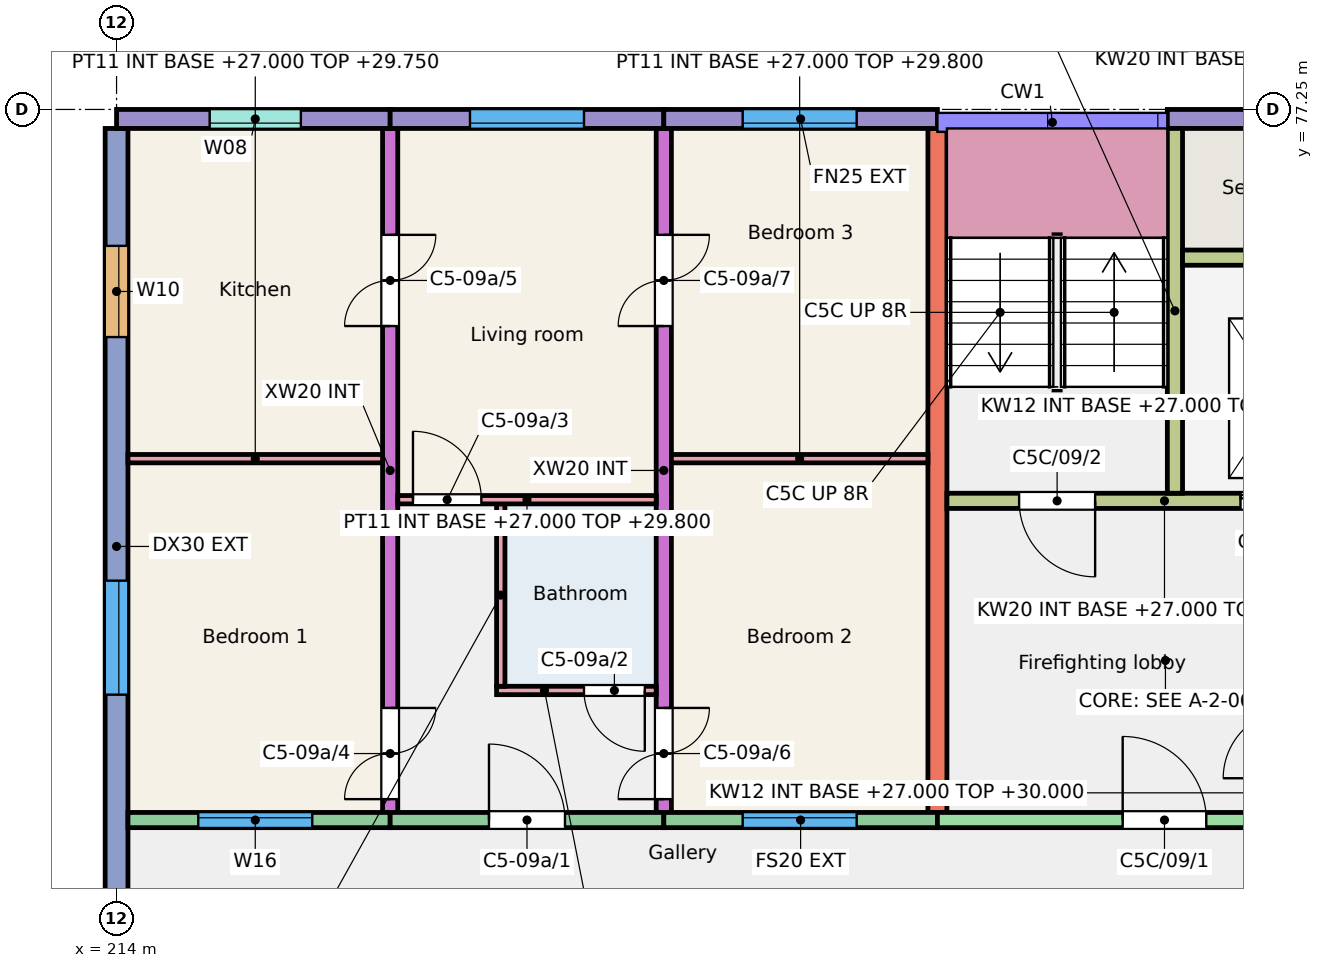
"""IFC4 building model, lengths in metres.
Left out: names, types, materials, properties, quantities, classifications, styles, units other than length and angle.
Written with IfcOpenShell. Run it as: python <this file> out.ifc"""

import sys

from ifc_helpers import new_model, si_unit, direction, frame, frame_2d, origin, place, context, subcontext, project, spatial, rectangle, extrude, element, fill, save


model = new_model("IFC4")
c1 = context("Model", 3, precision=1e-05, world=origin(), true_north=direction((0.0, 1.0)))
c2 = subcontext(c1, "Body", "Model", "MODEL_VIEW")
j1 = project(units=[si_unit("LENGTHUNIT", "METRE"), si_unit("PLANEANGLEUNIT", "RADIAN")], contexts=[c1])
p1 = place(None, origin())
s1 = spatial("IfcSite", under=j1, at=p1, CompositionType="ELEMENT")
p2 = place(p1, origin())
s2 = spatial("IfcBuilding", under=s1, at=p2, CompositionType="ELEMENT")
p3 = place(p2, frame((0.0, 0.0, 27.0)))
s3 = spatial("IfcBuildingStorey", under=s2, at=p3, CompositionType="ELEMENT", Elevation=27.0)
p4 = place(p3, frame((214.0, 66.0, 0.0), z_axis=(0.0, 0.0, 1.0), x_axis=(0.0, 1.0, 0.0)))
e1 = element("IfcWall", 1, at=p4, inside=s3, PredefinedType="SHEAR", context=c2, shape_type="SweptSolid", body=[
    extrude(rectangle(XDim=11.0, YDim=0.3, at=frame_2d((5.5, 0.0))), origin(), (0.0, 0.0, 1.0), 3.0),
])
p5 = place(p4, frame((3.55, 0.0, 0.9)))
e2 = element("IfcOpeningElement", 2, at=p5, cuts=e1, PredefinedType="OPENING", context=c2, shape_type="SweptSolid", body=[
    extrude(rectangle(XDim=1.5, YDim=1.5, at=frame_2d((0.75, 0.75))), frame((0.0, 0.16, 0.0), z_axis=(0.0, -1.0, 0.0), x_axis=(1.0, 0.0, 0.0)), (0.0, 0.0, 1.0), 0.32),
])
p6 = place(p4, frame((8.255, 0.0, 0.9)))
e3 = element("IfcOpeningElement", 3, at=p6, cuts=e1, PredefinedType="OPENING", context=c2, shape_type="SweptSolid", body=[
    extrude(rectangle(XDim=1.2, YDim=1.5, at=frame_2d((0.6, 0.75))), frame((0.0, 0.16, 0.0), z_axis=(0.0, -1.0, 0.0), x_axis=(1.0, 0.0, 0.0)), (0.0, 0.0, 1.0), 0.32),
])
p7 = place(p3, frame((217.6, 68.0, 0.0), z_axis=(0.0, 0.0, 1.0), x_axis=(0.0, 1.0, 0.0)))
e4 = element("IfcWall", 4, at=p7, inside=s3, PredefinedType="SHEAR", context=c2, shape_type="SweptSolid", body=[
    extrude(rectangle(XDim=9.0, YDim=0.2, at=frame_2d((4.5, 0.0))), origin(), (0.0, 0.0, 1.0), 3.0),
])
p8 = place(p7, frame((0.175, 0.0, 0.0)))
e5 = element("IfcOpeningElement", 5, at=p8, cuts=e4, PredefinedType="OPENING", context=c2, shape_type="SweptSolid", body=[
    extrude(rectangle(XDim=1.2, YDim=2.1, at=frame_2d((0.6, 1.05))), frame((0.0, 0.11, 0.0), z_axis=(0.0, -1.0, 0.0), x_axis=(1.0, 0.0, 0.0)), (0.0, 0.0, 1.0), 0.22),
])
p9 = place(p7, frame((6.4, 0.0, 0.0)))
e6 = element("IfcOpeningElement", 6, at=p9, cuts=e4, PredefinedType="OPENING", context=c2, shape_type="SweptSolid", body=[
    extrude(rectangle(XDim=1.2, YDim=2.1, at=frame_2d((0.6, 1.05))), frame((0.0, 0.11, 0.0), z_axis=(0.0, -1.0, 0.0), x_axis=(1.0, 0.0, 0.0)), (0.0, 0.0, 1.0), 0.22),
])
p10 = place(p3, frame((221.2, 68.0, 0.0), z_axis=(0.0, 0.0, 1.0), x_axis=(0.0, 1.0, 0.0)))
e7 = element("IfcWall", 7, at=p10, inside=s3, PredefinedType="SHEAR", context=c2, shape_type="SweptSolid", body=[
    extrude(rectangle(XDim=9.0, YDim=0.2, at=frame_2d((4.5, 0.0))), origin(), (0.0, 0.0, 1.0), 3.0),
])
p11 = place(p10, frame((0.175, 0.0, 0.0)))
e8 = element("IfcOpeningElement", 8, at=p11, cuts=e7, PredefinedType="OPENING", context=c2, shape_type="SweptSolid", body=[
    extrude(rectangle(XDim=1.2, YDim=2.1, at=frame_2d((0.6, 1.05))), frame((0.0, 0.11, 0.0), z_axis=(0.0, -1.0, 0.0), x_axis=(1.0, 0.0, 0.0)), (0.0, 0.0, 1.0), 0.22),
])
p12 = place(p10, frame((6.4, 0.0, 0.0)))
e9 = element("IfcOpeningElement", 9, at=p12, cuts=e7, PredefinedType="OPENING", context=c2, shape_type="SweptSolid", body=[
    extrude(rectangle(XDim=1.2, YDim=2.1, at=frame_2d((0.6, 1.05))), frame((0.0, 0.11, 0.0), z_axis=(0.0, -1.0, 0.0), x_axis=(1.0, 0.0, 0.0)), (0.0, 0.0, 1.0), 0.22),
])
p13 = place(p3, frame((224.8, 68.0, 0.0), z_axis=(0.0, 0.0, 1.0), x_axis=(0.0, 1.0, 0.0)))
e10 = element("IfcWall", 10, at=p13, inside=s3, PredefinedType="SHEAR", context=c2, shape_type="SweptSolid", body=[
    extrude(rectangle(XDim=9.0, YDim=0.25, at=frame_2d((4.5, 0.0))), origin(), (0.0, 0.0, 1.0), 3.0),
])
p14 = place(p3, frame((214.0, 77.125, 0.0), z_axis=(0.0, 0.0, 1.0), x_axis=(1.0, 0.0, 0.0)))
e11 = element("IfcWall", 11, at=p14, inside=s3, PredefinedType="SOLIDWALL", context=c2, shape_type="SweptSolid", body=[
    extrude(rectangle(XDim=3.6, YDim=0.25, at=frame_2d((1.8, 0.0))), origin(), (0.0, 0.0, 1.0), 3.0),
])
p15 = place(p14, frame((1.225, 0.0, 1.1)))
e12 = element("IfcOpeningElement", 12, at=p15, cuts=e11, PredefinedType="OPENING", context=c2, shape_type="SweptSolid", body=[
    extrude(rectangle(XDim=1.2, YDim=1.3, at=frame_2d((0.6, 0.65))), frame((0.0, 0.135, 0.0), z_axis=(0.0, -1.0, 0.0), x_axis=(1.0, 0.0, 0.0)), (0.0, 0.0, 1.0), 0.27),
])
p16 = place(p3, frame((214.15, 67.9, 0.0), z_axis=(0.0, 0.0, 1.0), x_axis=(1.0, 0.0, 0.0)))
e13 = element("IfcWall", 13, at=p16, inside=s3, PredefinedType="SOLIDWALL", context=c2, shape_type="SweptSolid", body=[
    extrude(rectangle(XDim=3.45, YDim=0.2, at=frame_2d((1.725, 0.0))), origin(), (0.0, 0.0, 1.0), 3.0),
])
p17 = place(p16, frame((0.925, 0.0, 0.9)))
e14 = element("IfcOpeningElement", 14, at=p17, cuts=e13, PredefinedType="OPENING", context=c2, shape_type="SweptSolid", body=[
    extrude(rectangle(XDim=1.5, YDim=1.5, at=frame_2d((0.75, 0.75))), frame((0.0, 0.11, 0.0), z_axis=(0.0, -1.0, 0.0), x_axis=(1.0, 0.0, 0.0)), (0.0, 0.0, 1.0), 0.22),
])
p18 = place(p3, frame((217.6, 77.125, 0.0), z_axis=(0.0, 0.0, 1.0), x_axis=(1.0, 0.0, 0.0)))
e15 = element("IfcWall", 15, at=p18, inside=s3, PredefinedType="SOLIDWALL", context=c2, shape_type="SweptSolid", body=[
    extrude(rectangle(XDim=3.6, YDim=0.25, at=frame_2d((1.8, 0.0))), origin(), (0.0, 0.0, 1.0), 3.0),
])
p19 = place(p18, frame((1.05, 0.0, 0.9)))
e16 = element("IfcOpeningElement", 16, at=p19, cuts=e15, PredefinedType="OPENING", context=c2, shape_type="SweptSolid", body=[
    extrude(rectangle(XDim=1.5, YDim=1.5, at=frame_2d((0.75, 0.75))), frame((0.0, 0.135, 0.0), z_axis=(0.0, -1.0, 0.0), x_axis=(1.0, 0.0, 0.0)), (0.0, 0.0, 1.0), 0.27),
])
p20 = place(p3, frame((217.6, 67.9, 0.0), z_axis=(0.0, 0.0, 1.0), x_axis=(1.0, 0.0, 0.0)))
e17 = element("IfcWall", 17, at=p20, inside=s3, PredefinedType="SOLIDWALL", context=c2, shape_type="SweptSolid", body=[
    extrude(rectangle(XDim=3.6, YDim=0.2, at=frame_2d((1.8, 0.0))), origin(), (0.0, 0.0, 1.0), 3.0),
])
p21 = place(p20, frame((1.3, 0.0, 0.0)))
e18 = element("IfcOpeningElement", 18, at=p21, cuts=e17, PredefinedType="OPENING", context=c2, shape_type="SweptSolid", body=[
    extrude(rectangle(XDim=1.0, YDim=2.1, at=frame_2d((0.5, 1.05))), frame((0.0, 0.11, 0.0), z_axis=(0.0, -1.0, 0.0), x_axis=(1.0, 0.0, 0.0)), (0.0, 0.0, 1.0), 0.22),
])
p22 = place(p3, frame((221.2, 77.125, 0.0), z_axis=(0.0, 0.0, 1.0), x_axis=(1.0, 0.0, 0.0)))
e19 = element("IfcWall", 19, at=p22, inside=s3, PredefinedType="SOLIDWALL", context=c2, shape_type="SweptSolid", body=[
    extrude(rectangle(XDim=3.6, YDim=0.25, at=frame_2d((1.8, 0.0))), origin(), (0.0, 0.0, 1.0), 3.0),
])
p23 = place(p22, frame((1.038, 0.0, 0.9)))
e20 = element("IfcOpeningElement", 20, at=p23, cuts=e19, PredefinedType="OPENING", context=c2, shape_type="SweptSolid", body=[
    extrude(rectangle(XDim=1.5, YDim=1.5, at=frame_2d((0.75, 0.75))), frame((0.0, 0.135, 0.0), z_axis=(0.0, -1.0, 0.0), x_axis=(1.0, 0.0, 0.0)), (0.0, 0.0, 1.0), 0.27),
])
p24 = place(p3, frame((221.2, 67.9, 0.0), z_axis=(0.0, 0.0, 1.0), x_axis=(1.0, 0.0, 0.0)))
e21 = element("IfcWall", 21, at=p24, inside=s3, PredefinedType="SOLIDWALL", context=c2, shape_type="SweptSolid", body=[
    extrude(rectangle(XDim=3.6, YDim=0.2, at=frame_2d((1.8, 0.0))), origin(), (0.0, 0.0, 1.0), 3.0),
])
p25 = place(p24, frame((1.038, 0.0, 0.9)))
e22 = element("IfcOpeningElement", 22, at=p25, cuts=e21, PredefinedType="OPENING", context=c2, shape_type="SweptSolid", body=[
    extrude(rectangle(XDim=1.5, YDim=1.5, at=frame_2d((0.75, 0.75))), frame((0.0, 0.11, 0.0), z_axis=(0.0, -1.0, 0.0), x_axis=(1.0, 0.0, 0.0)), (0.0, 0.0, 1.0), 0.22),
])
p26 = place(p3, frame((227.825, 77.125, 0.0), z_axis=(0.0, 0.0, 1.0), x_axis=(1.0, 0.0, 0.0)))
e23 = element("IfcWall", 23, at=p26, inside=s3, PredefinedType="SOLIDWALL", context=c2, shape_type="SweptSolid", body=[
    extrude(rectangle(XDim=2.975, YDim=0.25, at=frame_2d((1.488, 0.0))), origin(), (0.0, 0.0, 1.0), 3.0),
])
p27 = place(p3, frame((224.8, 67.9, 0.0), z_axis=(0.0, 0.0, 1.0), x_axis=(1.0, 0.0, 0.0)))
e24 = element("IfcWall", 24, at=p27, inside=s3, PredefinedType="SHEAR", context=c2, shape_type="SweptSolid", body=[
    extrude(rectangle(XDim=5.85, YDim=0.2, at=frame_2d((2.925, 0.0))), origin(), (0.0, 0.0, 1.0), 3.0),
])
p28 = place(p27, frame((2.438, 0.0, 0.0)))
e25 = element("IfcOpeningElement", 25, at=p28, cuts=e24, PredefinedType="OPENING", context=c2, shape_type="SweptSolid", body=[
    extrude(rectangle(XDim=1.1, YDim=2.1, at=frame_2d((0.55, 1.05))), frame((0.0, 0.11, 0.0), z_axis=(0.0, -1.0, 0.0), x_axis=(1.0, 0.0, 0.0)), (0.0, 0.0, 1.0), 0.22),
])
p29 = place(p3, frame((224.925, 72.1, 0.0), z_axis=(0.0, 0.0, 1.0), x_axis=(1.0, 0.0, 0.0)))
e26 = element("IfcWall", 26, at=p29, inside=s3, PredefinedType="SHEAR", context=c2, shape_type="SweptSolid", body=[
    extrude(rectangle(XDim=5.725, YDim=0.2, at=frame_2d((2.862, 0.0))), origin(), (0.0, 0.0, 1.0), 3.0),
])
p30 = place(p29, frame((0.95, 0.0, 0.0)))
e27 = element("IfcOpeningElement", 27, at=p30, cuts=e26, PredefinedType="OPENING", context=c2, shape_type="SweptSolid", body=[
    extrude(rectangle(XDim=1.0, YDim=2.1, at=frame_2d((0.5, 1.05))), frame((0.0, 0.11, 0.0), z_axis=(0.0, -1.0, 0.0), x_axis=(1.0, 0.0, 0.0)), (0.0, 0.0, 1.0), 0.22),
])
p31 = place(p29, frame((3.863, 0.0, 0.0)))
e28 = element("IfcOpeningElement", 28, at=p31, cuts=e26, PredefinedType="OPENING", context=c2, shape_type="SweptSolid", body=[
    extrude(rectangle(XDim=1.1, YDim=2.1, at=frame_2d((0.55, 1.05))), frame((0.0, 0.11, 0.0), z_axis=(0.0, -1.0, 0.0), x_axis=(1.0, 0.0, 0.0)), (0.0, 0.0, 1.0), 0.22),
])
p32 = place(p3, frame((227.925, 72.2, 0.0), z_axis=(0.0, 0.0, 1.0), x_axis=(0.0, 1.0, 0.0)))
e29 = element("IfcWall", 29, at=p32, inside=s3, PredefinedType="SHEAR", context=c2, shape_type="SweptSolid", body=[
    extrude(rectangle(XDim=4.8, YDim=0.2, at=frame_2d((2.4, 0.0))), origin(), (0.0, 0.0, 1.0), 3.0),
])
p33 = place(p3, frame((228.025, 75.3, 0.0), z_axis=(0.0, 0.0, 1.0), x_axis=(1.0, 0.0, 0.0)))
e30 = element("IfcWall", 30, at=p33, inside=s3, PredefinedType="SHEAR", context=c2, shape_type="SweptSolid", body=[
    extrude(rectangle(XDim=2.625, YDim=0.2, at=frame_2d((1.312, 0.0))), origin(), (0.0, 0.0, 1.0), 3.0),
])
p34 = place(p3, frame((219.0, 69.605, 0.0), z_axis=(0.0, 0.0, 1.0), x_axis=(1.0, 0.0, 0.0)))
e31 = element("IfcWall", 31, at=p34, inside=s3, PredefinedType="PARTITIONING", context=c2, shape_type="SweptSolid", body=[
    extrude(rectangle(XDim=2.1, YDim=0.11, at=frame_2d((1.05, 0.0))), origin(), (0.0, 0.0, 1.0), 2.8),
])
p35 = place(p34, frame((1.15, 0.0, 0.0)))
e32 = element("IfcOpeningElement", 32, at=p35, cuts=e31, PredefinedType="OPENING", context=c2, shape_type="SweptSolid", body=[
    extrude(rectangle(XDim=0.8, YDim=2.1, at=frame_2d((0.4, 1.05))), frame((0.0, 0.065, 0.0), z_axis=(0.0, -1.0, 0.0), x_axis=(1.0, 0.0, 0.0)), (0.0, 0.0, 1.0), 0.13),
])
p36 = place(p3, frame((219.055, 69.66, 0.0), z_axis=(0.0, 0.0, 1.0), x_axis=(0.0, 1.0, 0.0)))
e33 = element("IfcWall", 33, at=p36, inside=s3, PredefinedType="PARTITIONING", context=c2, shape_type="SweptSolid", body=[
    extrude(rectangle(XDim=2.4, YDim=0.11, at=frame_2d((1.2, 0.0))), origin(), (0.0, 0.0, 1.0), 2.8),
])
p37 = place(p3, frame((217.7, 72.115, 0.0), z_axis=(0.0, 0.0, 1.0), x_axis=(1.0, 0.0, 0.0)))
e34 = element("IfcWall", 34, at=p37, inside=s3, PredefinedType="PARTITIONING", context=c2, shape_type="SweptSolid", body=[
    extrude(rectangle(XDim=3.4, YDim=0.11, at=frame_2d((1.7, 0.0))), origin(), (0.0, 0.0, 1.0), 2.8),
])
p38 = place(p37, frame((0.2, 0.0, 0.0)))
e35 = element("IfcOpeningElement", 35, at=p38, cuts=e34, PredefinedType="OPENING", context=c2, shape_type="SweptSolid", body=[
    extrude(rectangle(XDim=0.9, YDim=2.1, at=frame_2d((0.45, 1.05))), frame((0.0, 0.065, 0.0), z_axis=(0.0, -1.0, 0.0), x_axis=(1.0, 0.0, 0.0)), (0.0, 0.0, 1.0), 0.13),
])
p39 = place(p3, frame((214.15, 72.655, 0.0), z_axis=(0.0, 0.0, 1.0), x_axis=(1.0, 0.0, 0.0)))
e36 = element("IfcWall", 36, at=p39, inside=s3, PredefinedType="PARTITIONING", context=c2, shape_type="SweptSolid", body=[
    extrude(rectangle(XDim=3.35, YDim=0.11, at=frame_2d((1.675, 0.0))), origin(), (0.0, 0.0, 1.0), 2.75),
])
p40 = place(p3, frame((221.3, 72.655, 0.0), z_axis=(0.0, 0.0, 1.0), x_axis=(1.0, 0.0, 0.0)))
e37 = element("IfcWall", 37, at=p40, inside=s3, PredefinedType="PARTITIONING", context=c2, shape_type="SweptSolid", body=[
    extrude(rectangle(XDim=3.375, YDim=0.11, at=frame_2d((1.688, 0.0))), origin(), (0.0, 0.0, 1.0), 2.8),
])
p41 = place(p17, origin())
e38 = element("IfcWindow", 38, at=p41, inside=s3, PartitioningType="SINGLE_PANEL", PredefinedType="WINDOW", context=c2, shape_type="SweptSolid", body=[
    extrude(rectangle(XDim=1.5, YDim=1.5, at=frame_2d((0.75, 0.75))), frame((0.0, 0.06, 0.0), z_axis=(0.0, -1.0, 0.0), x_axis=(1.0, 0.0, 0.0)), (0.0, 0.0, 1.0), 0.06),
])
fill(e14, e38)
p42 = place(p15, origin())
e39 = element("IfcWindow", 39, at=p42, inside=s3, PartitioningType="SINGLE_PANEL", PredefinedType="WINDOW", context=c2, shape_type="SweptSolid", body=[
    extrude(rectangle(XDim=1.2, YDim=1.3, at=frame_2d((0.6, 0.65))), frame((0.0, -0.025, 0.0), z_axis=(0.0, -1.0, 0.0), x_axis=(1.0, 0.0, 0.0)), (0.0, 0.0, 1.0), 0.06),
])
fill(e12, e39)
p43 = place(p25, origin())
e40 = element("IfcWindow", 40, at=p43, inside=s3, PartitioningType="SINGLE_PANEL", PredefinedType="WINDOW", context=c2, shape_type="SweptSolid", body=[
    extrude(rectangle(XDim=1.5, YDim=1.5, at=frame_2d((0.75, 0.75))), frame((0.0, 0.06, 0.0), z_axis=(0.0, -1.0, 0.0), x_axis=(1.0, 0.0, 0.0)), (0.0, 0.0, 1.0), 0.06),
])
fill(e22, e40)
p44 = place(p23, origin())
e41 = element("IfcWindow", 41, at=p44, inside=s3, PartitioningType="SINGLE_PANEL", PredefinedType="WINDOW", context=c2, shape_type="SweptSolid", body=[
    extrude(rectangle(XDim=1.5, YDim=1.5, at=frame_2d((0.75, 0.75))), frame((0.0, -0.025, 0.0), z_axis=(0.0, -1.0, 0.0), x_axis=(1.0, 0.0, 0.0)), (0.0, 0.0, 1.0), 0.06),
])
fill(e20, e41)
p45 = place(p19, origin())
e42 = element("IfcWindow", 42, at=p45, inside=s3, PartitioningType="SINGLE_PANEL", PredefinedType="WINDOW", context=c2, shape_type="SweptSolid", body=[
    extrude(rectangle(XDim=1.5, YDim=1.5, at=frame_2d((0.75, 0.75))), frame((0.0, -0.025, 0.0), z_axis=(0.0, -1.0, 0.0), x_axis=(1.0, 0.0, 0.0)), (0.0, 0.0, 1.0), 0.06),
])
fill(e16, e42)
p46 = place(p5, origin())
e43 = element("IfcWindow", 43, at=p46, inside=s3, PartitioningType="SINGLE_PANEL", PredefinedType="WINDOW", context=c2, shape_type="SweptSolid", body=[
    extrude(rectangle(XDim=1.5, YDim=1.5, at=frame_2d((0.75, 0.75))), frame((0.0, 0.0, 0.0), z_axis=(0.0, -1.0, 0.0), x_axis=(1.0, 0.0, 0.0)), (0.0, 0.0, 1.0), 0.06),
])
fill(e2, e43)
p47 = place(p6, origin())
e44 = element("IfcWindow", 44, at=p47, inside=s3, PartitioningType="SINGLE_PANEL", PredefinedType="WINDOW", context=c2, shape_type="SweptSolid", body=[
    extrude(rectangle(XDim=1.2, YDim=1.5, at=frame_2d((0.6, 0.75))), frame((0.0, 0.0, 0.0), z_axis=(0.0, -1.0, 0.0), x_axis=(1.0, 0.0, 0.0)), (0.0, 0.0, 1.0), 0.06),
])
fill(e3, e44)
p48 = place(p21, origin())
e45 = element("IfcDoor", 45, at=p48, inside=s3, OperationType="SINGLE_SWING_LEFT", PredefinedType="DOOR", context=c2, shape_type="SweptSolid", body=[
    extrude(rectangle(XDim=1.0, YDim=2.1, at=frame_2d((0.5, 1.05))), frame((0.0, 0.025, 0.0), z_axis=(0.0, -1.0, 0.0), x_axis=(1.0, 0.0, 0.0)), (0.0, 0.0, 1.0), 0.05),
])
fill(e18, e45)
p49 = place(p35, origin())
e46 = element("IfcDoor", 46, at=p49, inside=s3, OperationType="SINGLE_SWING_RIGHT", PredefinedType="DOOR", context=c2, shape_type="SweptSolid", body=[
    extrude(rectangle(XDim=0.8, YDim=2.1, at=frame_2d((0.4, 1.05))), frame((0.0, 0.025, 0.0), z_axis=(0.0, -1.0, 0.0), x_axis=(1.0, 0.0, 0.0)), (0.0, 0.0, 1.0), 0.05),
])
fill(e32, e46)
p50 = place(p38, origin())
e47 = element("IfcDoor", 47, at=p50, inside=s3, OperationType="SINGLE_SWING_LEFT", PredefinedType="DOOR", context=c2, shape_type="SweptSolid", body=[
    extrude(rectangle(XDim=0.9, YDim=2.1, at=frame_2d((0.45, 1.05))), frame((0.0, 0.025, 0.0), z_axis=(0.0, -1.0, 0.0), x_axis=(1.0, 0.0, 0.0)), (0.0, 0.0, 1.0), 0.05),
])
fill(e35, e47)
p51 = place(p8, origin())
e48 = element("IfcDoor", 48, at=p51, inside=s3, OperationType="DOUBLE_DOOR_SINGLE_SWING", PredefinedType="DOOR", context=c2, shape_type="SweptSolid", body=[
    extrude(rectangle(XDim=1.2, YDim=2.1, at=frame_2d((0.6, 1.05))), frame((0.0, 0.025, 0.0), z_axis=(0.0, -1.0, 0.0), x_axis=(1.0, 0.0, 0.0)), (0.0, 0.0, 1.0), 0.05),
])
fill(e5, e48)
p52 = place(p9, origin())
e49 = element("IfcDoor", 49, at=p52, inside=s3, OperationType="DOUBLE_DOOR_SINGLE_SWING", PredefinedType="DOOR", context=c2, shape_type="SweptSolid", body=[
    extrude(rectangle(XDim=1.2, YDim=2.1, at=frame_2d((0.6, 1.05))), frame((0.0, 0.025, 0.0), z_axis=(0.0, -1.0, 0.0), x_axis=(1.0, 0.0, 0.0)), (0.0, 0.0, 1.0), 0.05),
])
fill(e6, e49)
p53 = place(p11, origin())
e50 = element("IfcDoor", 50, at=p53, inside=s3, OperationType="DOUBLE_DOOR_SINGLE_SWING", PredefinedType="DOOR", context=c2, shape_type="SweptSolid", body=[
    extrude(rectangle(XDim=1.2, YDim=2.1, at=frame_2d((0.6, 1.05))), frame((0.0, 0.025, 0.0), z_axis=(0.0, -1.0, 0.0), x_axis=(1.0, 0.0, 0.0)), (0.0, 0.0, 1.0), 0.05),
])
fill(e8, e50)
p54 = place(p12, origin())
e51 = element("IfcDoor", 51, at=p54, inside=s3, OperationType="DOUBLE_DOOR_SINGLE_SWING", PredefinedType="DOOR", context=c2, shape_type="SweptSolid", body=[
    extrude(rectangle(XDim=1.2, YDim=2.1, at=frame_2d((0.6, 1.05))), frame((0.0, 0.025, 0.0), z_axis=(0.0, -1.0, 0.0), x_axis=(1.0, 0.0, 0.0)), (0.0, 0.0, 1.0), 0.05),
])
fill(e9, e51)
p55 = place(p28, origin())
e52 = element("IfcDoor", 52, at=p55, inside=s3, OperationType="SINGLE_SWING_LEFT", PredefinedType="DOOR", context=c2, shape_type="SweptSolid", body=[
    extrude(rectangle(XDim=1.1, YDim=2.1, at=frame_2d((0.55, 1.05))), frame((0.0, 0.025, 0.0), z_axis=(0.0, -1.0, 0.0), x_axis=(1.0, 0.0, 0.0)), (0.0, 0.0, 1.0), 0.05),
])
fill(e25, e52)
p56 = place(p30, origin())
e53 = element("IfcDoor", 53, at=p56, inside=s3, OperationType="SINGLE_SWING_RIGHT", PredefinedType="DOOR", context=c2, shape_type="SweptSolid", body=[
    extrude(rectangle(XDim=1.0, YDim=2.1, at=frame_2d((0.5, 1.05))), frame((0.0, 0.025, 0.0), z_axis=(0.0, -1.0, 0.0), x_axis=(1.0, 0.0, 0.0)), (0.0, 0.0, 1.0), 0.05),
])
fill(e27, e53)
p57 = place(p31, origin())
e54 = element("IfcDoor", 54, at=p57, inside=s3, OperationType="DOUBLE_DOOR_SLIDING", PredefinedType="DOOR", context=c2, shape_type="SweptSolid", body=[
    extrude(rectangle(XDim=1.1, YDim=2.1, at=frame_2d((0.55, 1.05))), frame((0.0, 0.025, 0.0), z_axis=(0.0, -1.0, 0.0), x_axis=(1.0, 0.0, 0.0)), (0.0, 0.0, 1.0), 0.05),
])
fill(e28, e54)
save(model, sys.argv[1])
